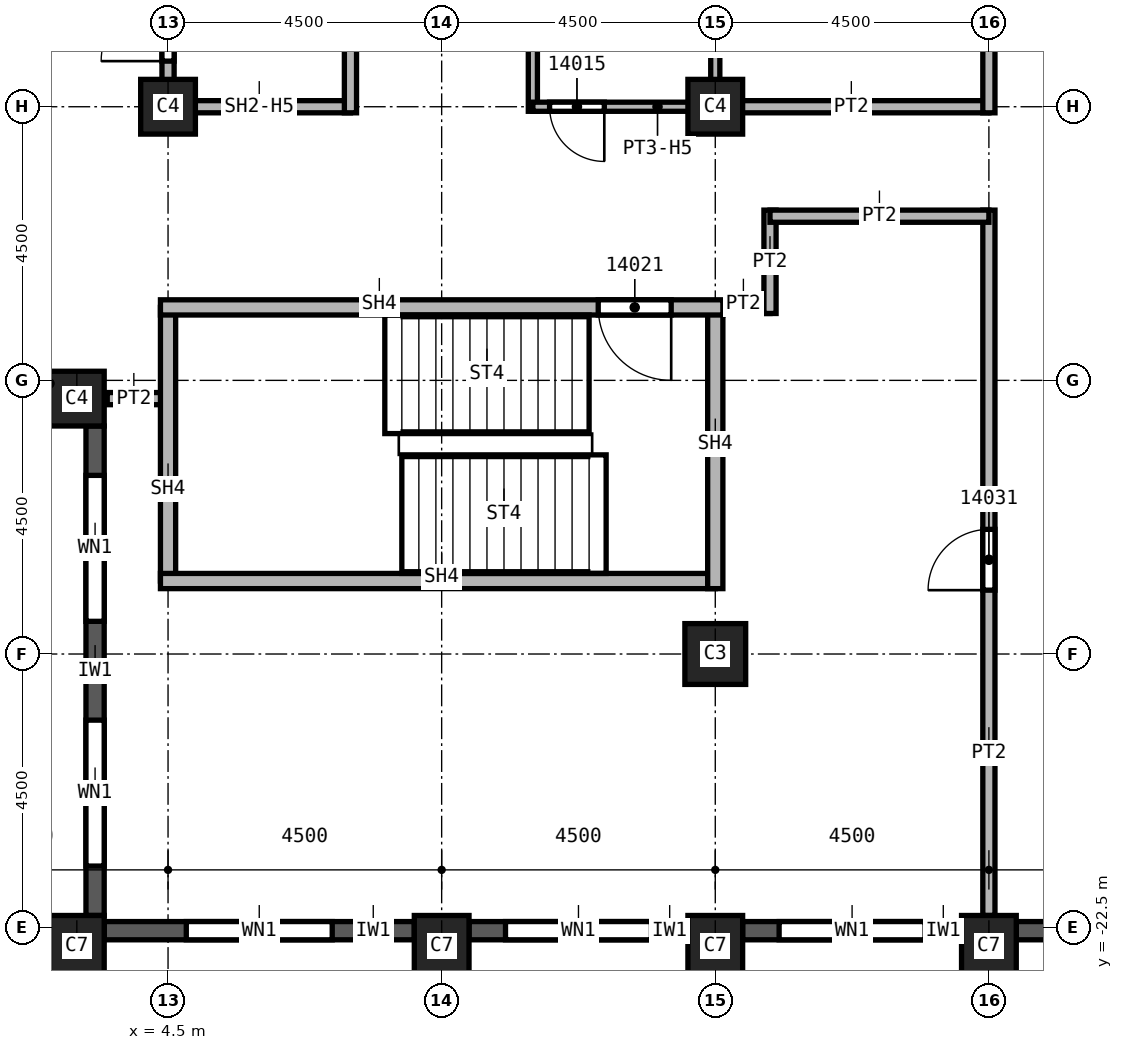
"""IFC4 building model, lengths in metres.
Left out: names, types, materials, properties, quantities, classifications, styles, units other than length and angle.
Written with IfcOpenShell. Run it as: python <this file> out.ifc"""

import sys

from ifc_helpers import new_model, si_unit, direction, frame, frame_2d, origin, origin_2d, place, context, subcontext, project, spatial, rectangle, extrude, element, fill, save


model = new_model("IFC4")
c1 = context("Model", 3, precision=1e-05, world=origin(), true_north=direction((0.0, 1.0)))
c2 = subcontext(c1, "Body", "Model", "MODEL_VIEW")
j1 = project(units=[si_unit("LENGTHUNIT", "METRE"), si_unit("PLANEANGLEUNIT", "RADIAN")], contexts=[c1])
p1 = place(None, origin())
s1 = spatial("IfcSite", under=j1, at=p1, CompositionType="ELEMENT")
p2 = place(p1, origin())
s2 = spatial("IfcBuilding", under=s1, at=p2, CompositionType="ELEMENT")
p3 = place(p2, frame((0.0, 0.0, 224.0)))
s3 = spatial("IfcBuildingStorey", under=s2, at=p3, CompositionType="ELEMENT", Elevation=224.0)
p4 = place(p3, frame((13.5, -18.0, 0.0), z_axis=(0.0, 0.0, 1.0), x_axis=(1.0, 0.0, 0.0)))
e1 = element("IfcColumn", 1, at=p4, inside=s3, PredefinedType="COLUMN", context=c2, shape_type="SweptSolid", body=[
    extrude(rectangle(XDim=1.0, YDim=1.0, at=origin_2d()), origin(), (0.0, 0.0, 1.0), 3.72),
])
for number, where, z_axis, x_axis in (
    (2, (4.5, -9.0, 0.0), (0.0, 0.0, 1.0), (1.0, 0.0, 0.0)),
    (3, (13.5, -9.0, 0.0), (0.0, 0.0, 1.0), (1.0, 0.0, 0.0)),
):
    element("IfcColumn", number, at=place(p3, frame(where, z_axis=z_axis, x_axis=x_axis)), inside=s3, PredefinedType="COLUMN", context=c2, shape_type="SweptSolid", body=[
        extrude(rectangle(XDim=0.9, YDim=0.9, at=origin_2d()), origin(), (0.0, 0.0, 1.0), 3.72),
    ])
for number, where, z_axis, x_axis in (
    (4, (3.0, -22.8, 0.0), (0.0, 0.0, 1.0), (1.0, 0.0, 0.0)),
    (5, (9.0, -22.8, 0.0), (0.0, 0.0, 1.0), (1.0, 0.0, 0.0)),
    (6, (13.5, -22.8, 0.0), (0.0, 0.0, 1.0), (1.0, 0.0, 0.0)),
    (7, (18.0, -22.8, 0.0), (0.0, 0.0, 1.0), (1.0, 0.0, 0.0)),
):
    element("IfcColumn", number, at=place(p3, frame(where, z_axis=z_axis, x_axis=x_axis)), inside=s3, PredefinedType="COLUMN", context=c2, shape_type="SweptSolid", body=[
        extrude(rectangle(XDim=0.9, YDim=1.0, at=origin_2d()), origin(), (0.0, 0.0, 1.0), 3.72),
    ])
p5 = place(p3, frame((3.0, -13.8, 0.0), z_axis=(0.0, 0.0, 1.0), x_axis=(1.0, 0.0, 0.0)))
e8 = element("IfcColumn", 8, at=p5, inside=s3, PredefinedType="COLUMN", context=c2, shape_type="SweptSolid", body=[
    extrude(rectangle(XDim=0.9, YDim=0.9, at=origin_2d()), origin(), (0.0, 0.0, 1.0), 3.72),
])
p6 = place(p3, frame((3.3, -14.25, 0.0), z_axis=(0.0, 0.0, 1.0), x_axis=(0.0, -1.0, 0.0)))
e9 = element("IfcWall", 9, at=p6, inside=s3, PredefinedType="SOLIDWALL", context=c2, shape_type="SweptSolid", body=[
    extrude(rectangle(XDim=8.05, YDim=0.3, at=frame_2d((4.025, 0.0))), origin(), (0.0, 0.0, 1.0), 3.12),
])
p7 = place(p6, frame((0.812, 0.0, 0.8)))
e10 = element("IfcOpeningElement", 10, at=p7, cuts=e9, PredefinedType="OPENING", context=c2, shape_type="SweptSolid", body=[
    extrude(rectangle(XDim=2.4, YDim=1.95, at=frame_2d((1.2, 0.975))), frame((0.0, 0.15, 0.0), z_axis=(0.0, -1.0, 0.0), x_axis=(1.0, 0.0, 0.0)), (0.0, 0.0, 1.0), 0.3),
])
p8 = place(p6, frame((4.837, 0.0, 0.8)))
e11 = element("IfcOpeningElement", 11, at=p8, cuts=e9, PredefinedType="OPENING", context=c2, shape_type="SweptSolid", body=[
    extrude(rectangle(XDim=2.4, YDim=1.95, at=frame_2d((1.2, 0.975))), frame((0.0, 0.15, 0.0), z_axis=(0.0, -1.0, 0.0), x_axis=(1.0, 0.0, 0.0)), (0.0, 0.0, 1.0), 0.3),
])
p9 = place(p3, frame((3.45, -22.55, 0.0), z_axis=(0.0, 0.0, 1.0), x_axis=(1.0, 0.0, 0.0)))
e12 = element("IfcWall", 12, at=p9, inside=s3, PredefinedType="SOLIDWALL", context=c2, shape_type="SweptSolid", body=[
    extrude(rectangle(XDim=5.1, YDim=0.3, at=frame_2d((2.55, 0.0))), origin(), (0.0, 0.0, 1.0), 3.12),
])
p10 = place(p9, frame((1.35, 0.0, 0.8)))
e13 = element("IfcOpeningElement", 13, at=p10, cuts=e12, PredefinedType="OPENING", context=c2, shape_type="SweptSolid", body=[
    extrude(rectangle(XDim=2.4, YDim=1.95, at=frame_2d((1.2, 0.975))), frame((0.0, 0.15, 0.0), z_axis=(0.0, -1.0, 0.0), x_axis=(1.0, 0.0, 0.0)), (0.0, 0.0, 1.0), 0.3),
])
p11 = place(p3, frame((9.45, -22.55, 0.0), z_axis=(0.0, 0.0, 1.0), x_axis=(1.0, 0.0, 0.0)))
e14 = element("IfcWall", 14, at=p11, inside=s3, PredefinedType="SOLIDWALL", context=c2, shape_type="SweptSolid", body=[
    extrude(rectangle(XDim=3.6, YDim=0.3, at=frame_2d((1.8, 0.0))), origin(), (0.0, 0.0, 1.0), 3.12),
])
p12 = place(p11, frame((0.6, 0.0, 0.8)))
e15 = element("IfcOpeningElement", 15, at=p12, cuts=e14, PredefinedType="OPENING", context=c2, shape_type="SweptSolid", body=[
    extrude(rectangle(XDim=2.4, YDim=1.95, at=frame_2d((1.2, 0.975))), frame((0.0, 0.15, 0.0), z_axis=(0.0, -1.0, 0.0), x_axis=(1.0, 0.0, 0.0)), (0.0, 0.0, 1.0), 0.3),
])
p13 = place(p3, frame((13.95, -22.55, 0.0), z_axis=(0.0, 0.0, 1.0), x_axis=(1.0, 0.0, 0.0)))
e16 = element("IfcWall", 16, at=p13, inside=s3, PredefinedType="SOLIDWALL", context=c2, shape_type="SweptSolid", body=[
    extrude(rectangle(XDim=3.6, YDim=0.3, at=frame_2d((1.8, 0.0))), origin(), (0.0, 0.0, 1.0), 3.12),
])
p14 = place(p13, frame((0.6, 0.0, 0.8)))
e17 = element("IfcOpeningElement", 17, at=p14, cuts=e16, PredefinedType="OPENING", context=c2, shape_type="SweptSolid", body=[
    extrude(rectangle(XDim=2.4, YDim=1.95, at=frame_2d((1.2, 0.975))), frame((0.0, 0.15, 0.0), z_axis=(0.0, -1.0, 0.0), x_axis=(1.0, 0.0, 0.0)), (0.0, 0.0, 1.0), 0.3),
])
p15 = place(p3, frame((18.45, -22.55, 0.0), z_axis=(0.0, 0.0, 1.0), x_axis=(1.0, 0.0, 0.0)))
e18 = element("IfcWall", 18, at=p15, inside=s3, PredefinedType="SOLIDWALL", context=c2, shape_type="SweptSolid", body=[
    extrude(rectangle(XDim=3.6, YDim=0.3, at=frame_2d((1.8, 0.0))), origin(), (0.0, 0.0, 1.0), 3.12),
])
p16 = place(p15, frame((0.625, 0.0, 0.8)))
e19 = element("IfcOpeningElement", 19, at=p16, cuts=e18, PredefinedType="OPENING", context=c2, shape_type="SweptSolid", body=[
    extrude(rectangle(XDim=0.6, YDim=1.95, at=frame_2d((0.3, 0.975))), frame((0.0, 0.15, 0.0), z_axis=(0.0, -1.0, 0.0), x_axis=(1.0, 0.0, 0.0)), (0.0, 0.0, 1.0), 0.3),
])
p17 = place(p15, frame((1.825, 0.0, 0.8)))
e20 = element("IfcOpeningElement", 20, at=p17, cuts=e18, PredefinedType="OPENING", context=c2, shape_type="SweptSolid", body=[
    extrude(rectangle(XDim=1.0, YDim=1.95, at=frame_2d((0.5, 0.975))), frame((0.0, 0.15, 0.0), z_axis=(0.0, -1.0, 0.0), x_axis=(1.0, 0.0, 0.0)), (0.0, 0.0, 1.0), 0.3),
])
p18 = place(p3, frame((4.5, -13.8, 0.0), z_axis=(0.0, 0.0, 1.0), x_axis=(-1.0, 0.0, 0.0)))
e21 = element("IfcWall", 21, at=p18, inside=s3, PredefinedType="PARTITIONING", context=c2, shape_type="SweptSolid", body=[
    extrude(rectangle(XDim=1.0, YDim=0.2, at=frame_2d((0.5, 0.0))), origin(), (0.0, 0.0, 1.0), 3.72),
])
p19 = place(p3, frame((13.5, -9.0, 0.0), z_axis=(0.0, 0.0, 1.0), x_axis=(1.0, 0.0, 0.0)))
e22 = element("IfcWall", 22, at=p19, inside=s3, PredefinedType="PARTITIONING", context=c2, shape_type="SweptSolid", body=[
    extrude(rectangle(XDim=4.5, YDim=0.2, at=frame_2d((2.25, 0.0))), origin(), (0.0, 0.0, 1.0), 3.72),
])
p20 = place(p3, frame((14.4, -12.3, 0.0), z_axis=(0.0, 0.0, 1.0), x_axis=(-1.0, 0.0, 0.0)))
e23 = element("IfcWall", 23, at=p20, inside=s3, PredefinedType="PARTITIONING", context=c2, shape_type="SweptSolid", body=[
    extrude(rectangle(XDim=1.025, YDim=0.2, at=frame_2d((0.512, 0.0))), origin(), (0.0, 0.0, 1.0), 3.72),
])
p21 = place(p3, frame((14.4, -10.7, 0.0), z_axis=(0.0, 0.0, 1.0), x_axis=(0.0, -1.0, 0.0)))
e24 = element("IfcWall", 24, at=p21, inside=s3, PredefinedType="PARTITIONING", context=c2, shape_type="SweptSolid", body=[
    extrude(rectangle(XDim=1.7, YDim=0.2, at=frame_2d((0.85, 0.0))), origin(), (0.0, 0.0, 1.0), 3.72),
])
p22 = place(p3, frame((18.0, -22.3, 0.0), z_axis=(0.0, 0.0, 1.0), x_axis=(0.0, 1.0, 0.0)))
e25 = element("IfcWall", 25, at=p22, inside=s3, PredefinedType="PARTITIONING", context=c2, shape_type="SweptSolid", body=[
    extrude(rectangle(XDim=11.6, YDim=0.2, at=frame_2d((5.8, 0.0))), origin(), (0.0, 0.0, 1.0), 3.72),
])
p23 = place(p22, frame((5.35, 0.0, 0.0)))
e26 = element("IfcOpeningElement", 26, at=p23, cuts=e25, PredefinedType="OPENING", context=c2, shape_type="SweptSolid", body=[
    extrude(rectangle(XDim=1.0, YDim=2.1, at=frame_2d((0.5, 1.05))), frame((0.0, 0.1, 0.0), z_axis=(0.0, -1.0, 0.0), x_axis=(1.0, 0.0, 0.0)), (0.0, 0.0, 1.0), 0.2),
])
p24 = place(p3, frame((18.0, -10.8, 0.0), z_axis=(0.0, 0.0, 1.0), x_axis=(-1.0, 0.0, 0.0)))
e27 = element("IfcWall", 27, at=p24, inside=s3, PredefinedType="PARTITIONING", context=c2, shape_type="SweptSolid", body=[
    extrude(rectangle(XDim=3.6, YDim=0.2, at=frame_2d((1.8, 0.0))), origin(), (0.0, 0.0, 1.0), 3.72),
])
p25 = place(p3, frame((18.0, -9.1, 0.0), z_axis=(0.0, 0.0, 1.0), x_axis=(0.0, 1.0, 0.0)))
e28 = element("IfcWall", 28, at=p25, inside=s3, PredefinedType="PARTITIONING", context=c2, shape_type="SweptSolid", body=[
    extrude(rectangle(XDim=18.2, YDim=0.2, at=frame_2d((9.1, 0.0))), origin(), (0.0, 0.0, 1.0), 3.72),
])
p26 = place(p25, frame((4.3, 0.0, 0.0)))
e29 = element("IfcOpeningElement", 29, at=p26, cuts=e28, PredefinedType="OPENING", context=c2, shape_type="SweptSolid", body=[
    extrude(rectangle(XDim=1.0, YDim=2.1, at=frame_2d((0.5, 1.05))), frame((0.0, 0.1, 0.0), z_axis=(0.0, -1.0, 0.0), x_axis=(1.0, 0.0, 0.0)), (0.0, 0.0, 1.0), 0.2),
])
p27 = place(p25, frame((12.4, 0.0, 0.0)))
e30 = element("IfcOpeningElement", 30, at=p27, cuts=e28, PredefinedType="OPENING", context=c2, shape_type="SweptSolid", body=[
    extrude(rectangle(XDim=1.0, YDim=2.1, at=frame_2d((0.5, 1.05))), frame((0.0, 0.1, 0.0), z_axis=(0.0, -1.0, 0.0), x_axis=(1.0, 0.0, 0.0)), (0.0, 0.0, 1.0), 0.2),
])
p28 = place(p3, frame((4.5, -9.1, 0.0), z_axis=(0.0, 0.0, 1.0), x_axis=(0.0, 1.0, 0.0)))
e31 = element("IfcWall", 31, at=p28, inside=s3, PredefinedType="SOLIDWALL", context=c2, shape_type="SweptSolid", body=[
    extrude(rectangle(XDim=3.1, YDim=0.2, at=frame_2d((1.55, 0.0))), origin(), (0.0, 0.0, 1.0), 2.958),
])
p29 = place(p28, frame((0.85, 0.0, 0.0)))
e32 = element("IfcOpeningElement", 32, at=p29, cuts=e31, PredefinedType="OPENING", context=c2, shape_type="SweptSolid", body=[
    extrude(rectangle(XDim=1.1, YDim=2.1, at=frame_2d((0.55, 1.05))), frame((0.0, 0.1, 0.0), z_axis=(0.0, -1.0, 0.0), x_axis=(1.0, 0.0, 0.0)), (0.0, 0.0, 1.0), 0.2),
])
p30 = place(p3, frame((7.5, -9.0, 0.0), z_axis=(0.0, 0.0, 1.0), x_axis=(-1.0, 0.0, 0.0)))
e33 = element("IfcWall", 33, at=p30, inside=s3, PredefinedType="SOLIDWALL", context=c2, shape_type="SweptSolid", body=[
    extrude(rectangle(XDim=3.0, YDim=0.2, at=frame_2d((1.5, 0.0))), origin(), (0.0, 0.0, 1.0), 2.958),
])
p31 = place(p3, frame((7.5, -6.0, 0.0), z_axis=(0.0, 0.0, 1.0), x_axis=(0.0, -1.0, 0.0)))
e34 = element("IfcWall", 34, at=p31, inside=s3, PredefinedType="SOLIDWALL", context=c2, shape_type="SweptSolid", body=[
    extrude(rectangle(XDim=3.1, YDim=0.2, at=frame_2d((1.55, 0.0))), origin(), (0.0, 0.0, 1.0), 3.72),
])
p32 = place(p3, frame((4.5, -16.8, 0.0), z_axis=(0.0, 0.0, 1.0), x_axis=(0.0, 1.0, 0.0)))
e35 = element("IfcWall", 35, at=p32, inside=s3, PredefinedType="SOLIDWALL", context=c2, shape_type="SweptSolid", body=[
    extrude(rectangle(XDim=4.5, YDim=0.25, at=frame_2d((2.25, 0.0))), origin(), (0.0, 0.0, 1.0), 3.72),
])
p33 = place(p3, frame((13.5, -16.8, 0.0), z_axis=(0.0, 0.0, 1.0), x_axis=(-1.0, 0.0, 0.0)))
e36 = element("IfcWall", 36, at=p33, inside=s3, PredefinedType="SOLIDWALL", context=c2, shape_type="SweptSolid", body=[
    extrude(rectangle(XDim=9.125, YDim=0.25, at=frame_2d((4.562, 0.0))), origin(), (0.0, 0.0, 1.0), 3.72),
])
p34 = place(p3, frame((13.5, -12.3, 0.0), z_axis=(0.0, 0.0, 1.0), x_axis=(0.0, -1.0, 0.0)))
e37 = element("IfcWall", 37, at=p34, inside=s3, PredefinedType="SOLIDWALL", context=c2, shape_type="SweptSolid", body=[
    extrude(rectangle(XDim=4.625, YDim=0.25, at=frame_2d((2.312, 0.0))), origin(), (0.0, 0.0, 1.0), 3.72),
])
p35 = place(p3, frame((13.625, -12.3, 0.0), z_axis=(0.0, 0.0, 1.0), x_axis=(-1.0, 0.0, 0.0)))
e38 = element("IfcWall", 38, at=p35, inside=s3, PredefinedType="SOLIDWALL", context=c2, shape_type="SweptSolid", body=[
    extrude(rectangle(XDim=9.25, YDim=0.25, at=frame_2d((4.625, 0.0))), origin(), (0.0, 0.0, 1.0), 3.72),
])
p36 = place(p35, frame((0.85, 0.0, 0.0)))
e39 = element("IfcOpeningElement", 39, at=p36, cuts=e38, PredefinedType="OPENING", context=c2, shape_type="SweptSolid", body=[
    extrude(rectangle(XDim=1.2, YDim=2.1, at=frame_2d((0.6, 1.05))), frame((0.0, 0.125, 0.0), z_axis=(0.0, -1.0, 0.0), x_axis=(1.0, 0.0, 0.0)), (0.0, 0.0, 1.0), 0.25),
])
p37 = place(p3, frame((10.5, -6.925, 0.0), z_axis=(0.0, 0.0, 1.0), x_axis=(0.0, -1.0, 0.0)))
e40 = element("IfcWall", 40, at=p37, inside=s3, PredefinedType="PARTITIONING", context=c2, shape_type="SweptSolid", body=[
    extrude(rectangle(XDim=2.15, YDim=0.15, at=frame_2d((1.075, 0.0))), origin(), (0.0, 0.0, 1.0), 3.72),
])
p38 = place(p3, frame((13.5, -7.0, 0.0), z_axis=(0.0, 0.0, 1.0), x_axis=(0.0, -1.0, 0.0)))
e41 = element("IfcWall", 41, at=p38, inside=s3, PredefinedType="PARTITIONING", context=c2, shape_type="SweptSolid", body=[
    extrude(rectangle(XDim=2.1, YDim=0.15, at=frame_2d((1.05, 0.0))), origin(), (0.0, 0.0, 1.0), 2.958),
])
p39 = place(p3, frame((13.575, -9.0, 0.0), z_axis=(0.0, 0.0, 1.0), x_axis=(-1.0, 0.0, 0.0)))
e42 = element("IfcWall", 42, at=p39, inside=s3, PredefinedType="PARTITIONING", context=c2, shape_type="SweptSolid", body=[
    extrude(rectangle(XDim=3.075, YDim=0.15, at=frame_2d((1.538, 0.0))), origin(), (0.0, 0.0, 1.0), 2.958),
])
p40 = place(p39, frame((1.9, 0.0, 0.0)))
e43 = element("IfcOpeningElement", 43, at=p40, cuts=e42, PredefinedType="OPENING", context=c2, shape_type="SweptSolid", body=[
    extrude(rectangle(XDim=0.9, YDim=2.1, at=frame_2d((0.45, 1.05))), frame((0.0, 0.075, 0.0), z_axis=(0.0, -1.0, 0.0), x_axis=(1.0, 0.0, 0.0)), (0.0, 0.0, 1.0), 0.15),
])
p41 = place(p7, origin())
e44 = element("IfcWindow", 44, at=p41, inside=s3, PartitioningType="SINGLE_PANEL", PredefinedType="WINDOW", context=c2, shape_type="SweptSolid", body=[
    extrude(rectangle(XDim=2.4, YDim=1.95, at=frame_2d((1.2, 0.975))), frame((0.0, 0.03, 0.0), z_axis=(0.0, -1.0, 0.0), x_axis=(1.0, 0.0, 0.0)), (0.0, 0.0, 1.0), 0.06),
])
fill(e10, e44)
p42 = place(p8, origin())
e45 = element("IfcWindow", 45, at=p42, inside=s3, PartitioningType="SINGLE_PANEL", PredefinedType="WINDOW", context=c2, shape_type="SweptSolid", body=[
    extrude(rectangle(XDim=2.4, YDim=1.95, at=frame_2d((1.2, 0.975))), frame((0.0, 0.03, 0.0), z_axis=(0.0, -1.0, 0.0), x_axis=(1.0, 0.0, 0.0)), (0.0, 0.0, 1.0), 0.06),
])
fill(e11, e45)
p43 = place(p10, origin())
e46 = element("IfcWindow", 46, at=p43, inside=s3, PartitioningType="SINGLE_PANEL", PredefinedType="WINDOW", context=c2, shape_type="SweptSolid", body=[
    extrude(rectangle(XDim=2.4, YDim=1.95, at=frame_2d((1.2, 0.975))), frame((0.0, 0.03, 0.0), z_axis=(0.0, -1.0, 0.0), x_axis=(1.0, 0.0, 0.0)), (0.0, 0.0, 1.0), 0.06),
])
fill(e13, e46)
p44 = place(p12, origin())
e47 = element("IfcWindow", 47, at=p44, inside=s3, PartitioningType="SINGLE_PANEL", PredefinedType="WINDOW", context=c2, shape_type="SweptSolid", body=[
    extrude(rectangle(XDim=2.4, YDim=1.95, at=frame_2d((1.2, 0.975))), frame((0.0, 0.03, 0.0), z_axis=(0.0, -1.0, 0.0), x_axis=(1.0, 0.0, 0.0)), (0.0, 0.0, 1.0), 0.06),
])
fill(e15, e47)
p45 = place(p14, origin())
e48 = element("IfcWindow", 48, at=p45, inside=s3, PartitioningType="SINGLE_PANEL", PredefinedType="WINDOW", context=c2, shape_type="SweptSolid", body=[
    extrude(rectangle(XDim=2.4, YDim=1.95, at=frame_2d((1.2, 0.975))), frame((0.0, 0.03, 0.0), z_axis=(0.0, -1.0, 0.0), x_axis=(1.0, 0.0, 0.0)), (0.0, 0.0, 1.0), 0.06),
])
fill(e17, e48)
p46 = place(p29, origin())
e49 = element("IfcDoor", 49, at=p46, inside=s3, OperationType="SINGLE_SWING_LEFT", PredefinedType="DOOR", context=c2, shape_type="SweptSolid", body=[
    extrude(rectangle(XDim=1.1, YDim=2.1, at=frame_2d((0.55, 1.05))), frame((0.0, 0.025, 0.0), z_axis=(0.0, -1.0, 0.0), x_axis=(1.0, 0.0, 0.0)), (0.0, 0.0, 1.0), 0.05),
])
fill(e32, e49)
p47 = place(p40, origin())
e50 = element("IfcDoor", 50, at=p47, inside=s3, OperationType="SINGLE_SWING_RIGHT", PredefinedType="DOOR", context=c2, shape_type="SweptSolid", body=[
    extrude(rectangle(XDim=0.9, YDim=2.1, at=frame_2d((0.45, 1.05))), frame((0.0, 0.025, 0.0), z_axis=(0.0, -1.0, 0.0), x_axis=(1.0, 0.0, 0.0)), (0.0, 0.0, 1.0), 0.05),
])
fill(e43, e50)
p48 = place(p36, origin())
e51 = element("IfcDoor", 51, at=p48, inside=s3, OperationType="SINGLE_SWING_RIGHT", PredefinedType="DOOR", context=c2, shape_type="SweptSolid", body=[
    extrude(rectangle(XDim=1.2, YDim=2.1, at=frame_2d((0.6, 1.05))), frame((0.0, 0.025, 0.0), z_axis=(0.0, -1.0, 0.0), x_axis=(1.0, 0.0, 0.0)), (0.0, 0.0, 1.0), 0.05),
])
fill(e39, e51)
p49 = place(p23, origin())
e52 = element("IfcDoor", 52, at=p49, inside=s3, OperationType="SINGLE_SWING_RIGHT", PredefinedType="DOOR", context=c2, shape_type="SweptSolid", body=[
    extrude(rectangle(XDim=1.0, YDim=2.1, at=frame_2d((0.5, 1.05))), frame((0.0, 0.025, 0.0), z_axis=(0.0, -1.0, 0.0), x_axis=(1.0, 0.0, 0.0)), (0.0, 0.0, 1.0), 0.05),
])
fill(e26, e52)
save(model, sys.argv[1])
